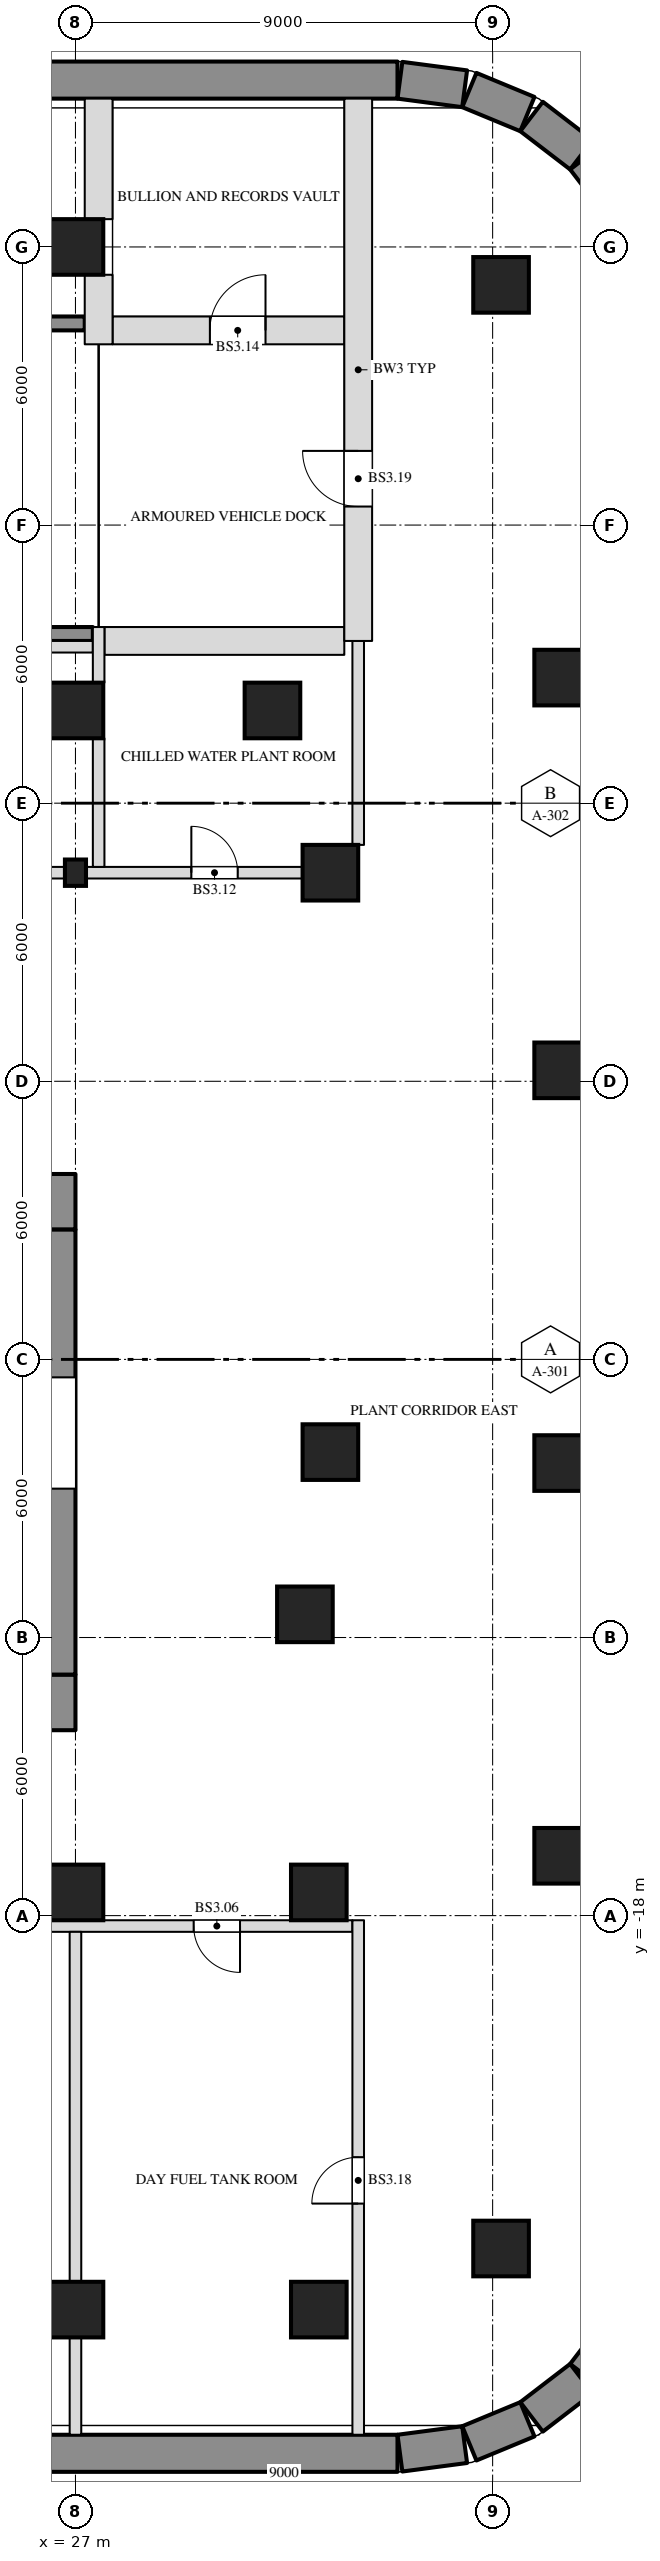
"""IFC4 building model, lengths in metres.
Left out: names, types, materials, properties, quantities, classifications, styles, units other than length and angle.
Written with IfcOpenShell. Run it as: python <this file> out.ifc"""

import sys

from ifc_helpers import new_model, si_unit, direction, frame, frame_2d, origin, origin_2d, place, context, subcontext, project, spatial, rectangle, i_section, extrude, element, fill, save


model = new_model("IFC4")
c1 = context("Model", 3, precision=1e-05, world=origin(), true_north=direction((0.0, 1.0)))
c2 = subcontext(c1, "Body", "Model", "MODEL_VIEW")
j1 = project(units=[si_unit("LENGTHUNIT", "METRE"), si_unit("PLANEANGLEUNIT", "RADIAN")], contexts=[c1])
p1 = place(None, origin())
s1 = spatial("IfcSite", under=j1, at=p1, CompositionType="ELEMENT")
p2 = place(p1, origin())
s2 = spatial("IfcBuilding", under=s1, at=p2, CompositionType="ELEMENT")
p3 = place(p2, frame((0.0, 0.0, -12.6)))
s3 = spatial("IfcBuildingStorey", under=s2, at=p3, CompositionType="ELEMENT", Elevation=-12.6)
for number, where, z_axis, x_axis in (
    (1, (33.948, -29.6, 0.0), (0.0, 0.0, 1.0), (-1.0, 0.0, 0.0)),
    (2, (-33.948, 21.6, 0.0), (0.0, 0.0, 1.0), (1.0, 0.0, 0.0)),
):
    element("IfcWall", number, at=place(p3, frame(where, z_axis=z_axis, x_axis=x_axis)), inside=s3, PredefinedType="SOLIDWALL", context=c2, shape_type="SweptSolid", body=[
        extrude(rectangle(XDim=67.895, YDim=0.8, at=frame_2d((33.948, 0.0))), origin(), (0.0, 0.0, 1.0), 4.2),
    ])
p4 = place(p3, frame((34.0, 21.597, 0.0), z_axis=(0.0, 0.0, 1.0), x_axis=(0.99144603414, -0.130517283865, 0.0)))
e3 = element("IfcWall", 3, at=p4, inside=s3, PredefinedType="SOLIDWALL", context=c2, shape_type="SweptSolid", body=[
    extrude(rectangle(XDim=1.408, YDim=0.8, at=frame_2d((0.704, 0.0))), origin(), (0.0, 0.0, 1.0), 4.2),
])
for number, where, z_axis, x_axis in (
    (4, (35.497, 21.386, 0.0), (0.0, 0.0, 1.0), (0.924, -0.383, 0.0)),
    (5, (36.84, 20.815, 0.0), (0.0, 0.0, 1.0), (0.793, -0.609, 0.0)),
    (6, (37.99, 19.916, 0.0), (0.0, 0.0, 1.0), (0.609, -0.793, 0.0)),
    (7, (38.815, -26.84, 0.0), (0.0, 0.0, 1.0), (-0.609, -0.793, 0.0)),
    (8, (37.916, -27.99, 0.0), (0.0, 0.0, 1.0), (-0.793, -0.609, 0.0)),
    (9, (36.75, -28.867, 0.0), (0.0, 0.0, 1.0), (-0.924, -0.383, 0.0)),
):
    element("IfcWall", number, at=place(p3, frame(where, z_axis=z_axis, x_axis=x_axis)), inside=s3, PredefinedType="SOLIDWALL", context=c2, shape_type="SweptSolid", body=[
        extrude(rectangle(XDim=1.355, YDim=0.8, at=frame_2d((0.678, 0.0))), origin(), (0.0, 0.0, 1.0), 4.2),
    ])
p5 = place(p3, frame((35.396, -29.413, 0.0), z_axis=(0.0, 0.0, 1.0), x_axis=(-0.99144603414, -0.130517283865, 0.0)))
e10 = element("IfcWall", 10, at=p5, inside=s3, PredefinedType="SOLIDWALL", context=c2, shape_type="SweptSolid", body=[
    extrude(rectangle(XDim=1.408, YDim=0.8, at=frame_2d((0.704, 0.0))), origin(), (0.0, 0.0, 1.0), 4.2),
])
for number, where, z_axis, x_axis in (
    (11, (27.0, -26.5, 0.0), (0.0, 0.0, 1.0), (1.0, 0.0, 0.0)),
    (12, (32.25, -26.5, 0.0), (0.0, 0.0, 1.0), (1.0, 0.0, 0.0)),
    (13, (36.182, -25.182, 0.0), (0.0, 0.0, 1.0), (1.0, 0.0, 0.0)),
    (14, (27.0, -17.5, 0.0), (0.0, 0.0, 1.0), (1.0, 0.0, 0.0)),
    (15, (32.25, -17.5, 0.0), (0.0, 0.0, 1.0), (1.0, 0.0, 0.0)),
    (16, (37.5, -16.709, 0.0), (0.0, 0.0, 1.0), (1.0, 0.0, 0.0)),
    (17, (31.95, -11.5, 0.0), (0.0, 0.0, 1.0), (1.0, 0.0, 0.0)),
    (18, (37.5, -8.236, 0.0), (0.0, 0.0, 1.0), (1.0, 0.0, 0.0)),
    (19, (32.5, -8.0, 0.0), (0.0, 0.0, 1.0), (1.0, 0.0, 0.0)),
    (20, (37.5, 0.236, 0.0), (0.0, 0.0, 1.0), (1.0, 0.0, 0.0)),
):
    element("IfcColumn", number, at=place(p3, frame(where, z_axis=z_axis, x_axis=x_axis)), inside=s3, PredefinedType="COLUMN", context=c2, shape_type="SweptSolid", body=[
        extrude(rectangle(XDim=1.2, YDim=1.2, at=origin_2d()), origin(), (0.0, 0.0, 1.0), 4.2),
    ])
p6 = place(p3, frame((27.0, 4.5, 0.0), z_axis=(0.0, 0.0, 1.0), x_axis=(1.0, 0.0, 0.0)))
e21 = element("IfcColumn", 21, at=p6, inside=s3, PredefinedType="COLUMN", context=c2, shape_type="SweptSolid", body=[
    extrude(i_section(OverallWidth=0.455, OverallDepth=0.569, WebThickness=0.078, FlangeThickness=0.125, at=origin_2d()), origin(), (0.0, 0.0, 1.0), 4.2),
])
for number, where, z_axis, x_axis in (
    (22, (32.5, 4.5, 0.0), (0.0, 0.0, 1.0), (1.0, 0.0, 0.0)),
    (23, (27.0, 8.0, 0.0), (0.0, 0.0, 1.0), (1.0, 0.0, 0.0)),
    (24, (31.25, 8.0, 0.0), (0.0, 0.0, 1.0), (1.0, 0.0, 0.0)),
    (25, (37.5, 8.709, 0.0), (0.0, 0.0, 1.0), (1.0, 0.0, 0.0)),
    (26, (36.182, 17.182, 0.0), (0.0, 0.0, 1.0), (1.0, 0.0, 0.0)),
    (27, (27.0, 18.0, 0.0), (0.0, 0.0, 1.0), (1.0, 0.0, 0.0)),
):
    element("IfcColumn", number, at=place(p3, frame(where, z_axis=z_axis, x_axis=x_axis)), inside=s3, PredefinedType="COLUMN", context=c2, shape_type="SweptSolid", body=[
        extrude(rectangle(XDim=1.2, YDim=1.2, at=origin_2d()), origin(), (0.0, 0.0, 1.0), 4.2),
    ])
p7 = place(p3, frame((-27.0, -2.6, 0.0), z_axis=(0.0, 0.0, 1.0), x_axis=(1.0, 0.0, 0.0)))
e28 = element("IfcWall", 28, at=p7, inside=s3, PredefinedType="SHEAR", context=c2, shape_type="SweptSolid", body=[
    extrude(rectangle(XDim=54.0, YDim=1.2, at=frame_2d((27.0, 0.0))), origin(), (0.0, 0.0, 1.0), 3.9),
])
p8 = place(p7, frame((15.15, 0.0, 0.0)))
e29 = element("IfcOpeningElement", 29, at=p8, cuts=e28, PredefinedType="OPENING", context=c2, shape_type="SweptSolid", body=[
    extrude(rectangle(XDim=2.4, YDim=2.1, at=frame_2d((1.2, 1.05))), frame((0.0, 0.612, 0.0), z_axis=(0.0, -1.0, 0.0), x_axis=(1.0, 0.0, 0.0)), (0.0, 0.0, 1.0), 1.224),
])
p9 = place(p7, frame((36.45, 0.0, 0.0)))
e30 = element("IfcOpeningElement", 30, at=p9, cuts=e28, PredefinedType="OPENING", context=c2, shape_type="SweptSolid", body=[
    extrude(rectangle(XDim=2.4, YDim=2.1, at=frame_2d((1.2, 1.05))), frame((0.0, 0.612, 0.0), z_axis=(0.0, -1.0, 0.0), x_axis=(1.0, 0.0, 0.0)), (0.0, 0.0, 1.0), 1.224),
])
p10 = place(p3, frame((-27.0, -13.4, 0.0), z_axis=(0.0, 0.0, 1.0), x_axis=(1.0, 0.0, 0.0)))
e31 = element("IfcWall", 31, at=p10, inside=s3, PredefinedType="SHEAR", context=c2, shape_type="SweptSolid", body=[
    extrude(rectangle(XDim=54.0, YDim=1.2, at=frame_2d((27.0, 0.0))), origin(), (0.0, 0.0, 1.0), 3.9),
])
p11 = place(p10, frame((16.45, 0.0, 0.0)))
e32 = element("IfcOpeningElement", 32, at=p11, cuts=e31, PredefinedType="OPENING", context=c2, shape_type="SweptSolid", body=[
    extrude(rectangle(XDim=1.0, YDim=2.1, at=frame_2d((0.5, 1.05))), frame((0.0, 0.612, 0.0), z_axis=(0.0, -1.0, 0.0), x_axis=(1.0, 0.0, 0.0)), (0.0, 0.0, 1.0), 1.224),
])
p12 = place(p10, frame((36.55, 0.0, 0.0)))
e33 = element("IfcOpeningElement", 33, at=p12, cuts=e31, PredefinedType="OPENING", context=c2, shape_type="SweptSolid", body=[
    extrude(rectangle(XDim=1.0, YDim=2.1, at=frame_2d((0.5, 1.05))), frame((0.0, 0.612, 0.0), z_axis=(0.0, -1.0, 0.0), x_axis=(1.0, 0.0, 0.0)), (0.0, 0.0, 1.0), 1.224),
])
p13 = place(p3, frame((26.4, -12.8, 0.0), z_axis=(0.0, 0.0, 1.0), x_axis=(0.0, 1.0, 0.0)))
e34 = element("IfcWall", 34, at=p13, inside=s3, PredefinedType="SHEAR", context=c2, shape_type="SweptSolid", body=[
    extrude(rectangle(XDim=9.6, YDim=1.2, at=frame_2d((4.8, 0.0))), origin(), (0.0, 0.0, 1.0), 3.9),
])
p14 = place(p13, frame((4.012, 0.0, 0.0)))
e35 = element("IfcOpeningElement", 35, at=p14, cuts=e34, PredefinedType="OPENING", context=c2, shape_type="SweptSolid", body=[
    extrude(rectangle(XDim=2.4, YDim=2.1, at=frame_2d((1.2, 1.05))), frame((0.0, 0.612, 0.0), z_axis=(0.0, -1.0, 0.0), x_axis=(1.0, 0.0, 0.0)), (0.0, 0.0, 1.0), 1.224),
])
p15 = place(p3, frame((-32.975, -18.225, 0.0), z_axis=(0.0, 0.0, 1.0), x_axis=(1.0, 0.0, 0.0)))
e36 = element("IfcWall", 36, at=p15, inside=s3, PredefinedType="SOLIDWALL", context=c2, shape_type="SweptSolid", body=[
    extrude(rectangle(XDim=65.95, YDim=0.25, at=frame_2d((32.975, 0.0))), origin(), (0.0, 0.0, 1.0), 3.9),
])
p16 = place(p15, frame((2.425, 0.0, 0.0)))
e37 = element("IfcOpeningElement", 37, at=p16, cuts=e36, PredefinedType="OPENING", context=c2, shape_type="SweptSolid", body=[
    extrude(rectangle(XDim=1.0, YDim=2.1, at=frame_2d((0.5, 1.05))), frame((0.0, 0.137, 0.0), z_axis=(0.0, -1.0, 0.0), x_axis=(1.0, 0.0, 0.0)), (0.0, 0.0, 1.0), 0.274),
])
p17 = place(p15, frame((9.575, 0.0, 0.0)))
e38 = element("IfcOpeningElement", 38, at=p17, cuts=e36, PredefinedType="OPENING", context=c2, shape_type="SweptSolid", body=[
    extrude(rectangle(XDim=1.8, YDim=2.1, at=frame_2d((0.9, 1.05))), frame((0.0, 0.137, 0.0), z_axis=(0.0, -1.0, 0.0), x_axis=(1.0, 0.0, 0.0)), (0.0, 0.0, 1.0), 0.274),
])
p18 = place(p15, frame((18.575, 0.0, 0.0)))
e39 = element("IfcOpeningElement", 39, at=p18, cuts=e36, PredefinedType="OPENING", context=c2, shape_type="SweptSolid", body=[
    extrude(rectangle(XDim=1.8, YDim=2.1, at=frame_2d((0.9, 1.05))), frame((0.0, 0.137, 0.0), z_axis=(0.0, -1.0, 0.0), x_axis=(1.0, 0.0, 0.0)), (0.0, 0.0, 1.0), 0.274),
])
p19 = place(p15, frame((33.575, 0.0, 0.0)))
e40 = element("IfcOpeningElement", 40, at=p19, cuts=e36, PredefinedType="OPENING", context=c2, shape_type="SweptSolid", body=[
    extrude(rectangle(XDim=1.8, YDim=2.1, at=frame_2d((0.9, 1.05))), frame((0.0, 0.137, 0.0), z_axis=(0.0, -1.0, 0.0), x_axis=(1.0, 0.0, 0.0)), (0.0, 0.0, 1.0), 0.274),
])
p20 = place(p15, frame((51.575, 0.0, 0.0)))
e41 = element("IfcOpeningElement", 41, at=p20, cuts=e36, PredefinedType="OPENING", context=c2, shape_type="SweptSolid", body=[
    extrude(rectangle(XDim=1.8, YDim=2.1, at=frame_2d((0.9, 1.05))), frame((0.0, 0.137, 0.0), z_axis=(0.0, -1.0, 0.0), x_axis=(1.0, 0.0, 0.0)), (0.0, 0.0, 1.0), 0.274),
])
p21 = place(p15, frame((62.525, 0.0, 0.0)))
e42 = element("IfcOpeningElement", 42, at=p21, cuts=e36, PredefinedType="OPENING", context=c2, shape_type="SweptSolid", body=[
    extrude(rectangle(XDim=1.0, YDim=2.1, at=frame_2d((0.5, 1.05))), frame((0.0, 0.137, 0.0), z_axis=(0.0, -1.0, 0.0), x_axis=(1.0, 0.0, 0.0)), (0.0, 0.0, 1.0), 0.274),
])
p22 = place(p3, frame((18.227, 4.5, 0.0), z_axis=(0.0, 0.0, 1.0), x_axis=(1.0, 0.0, 0.0)))
e43 = element("IfcWall", 43, at=p22, inside=s3, PredefinedType="SOLIDWALL", context=c2, shape_type="SweptSolid", body=[
    extrude(rectangle(XDim=8.545, YDim=0.25, at=frame_2d((4.273, 0.0))), origin(), (0.0, 0.0, 1.0), 3.9),
])
p23 = place(p22, frame((3.773, 0.0, 0.0)))
e44 = element("IfcOpeningElement", 44, at=p23, cuts=e43, PredefinedType="OPENING", context=c2, shape_type="SweptSolid", body=[
    extrude(rectangle(XDim=1.0, YDim=2.1, at=frame_2d((0.5, 1.05))), frame((0.0, 0.137, 0.0), z_axis=(0.0, -1.0, 0.0), x_axis=(1.0, 0.0, 0.0)), (0.0, 0.0, 1.0), 0.274),
])
p24 = place(p3, frame((27.227, 4.5, 0.0), z_axis=(0.0, 0.0, 1.0), x_axis=(1.0, 0.0, 0.0)))
e45 = element("IfcWall", 45, at=p24, inside=s3, PredefinedType="SOLIDWALL", context=c2, shape_type="SweptSolid", body=[
    extrude(rectangle(XDim=4.673, YDim=0.25, at=frame_2d((2.336, 0.0))), origin(), (0.0, 0.0, 1.0), 3.9),
])
p25 = place(p24, frame((2.273, 0.0, 0.0)))
e46 = element("IfcOpeningElement", 46, at=p25, cuts=e45, PredefinedType="OPENING", context=c2, shape_type="SweptSolid", body=[
    extrude(rectangle(XDim=1.0, YDim=2.1, at=frame_2d((0.5, 1.05))), frame((0.0, 0.137, 0.0), z_axis=(0.0, -1.0, 0.0), x_axis=(1.0, 0.0, 0.0)), (0.0, 0.0, 1.0), 0.274),
])
p26 = place(p3, frame((-1.7, 9.375, 0.0), z_axis=(0.0, 0.0, 1.0), x_axis=(1.0, 0.0, 0.0)))
e47 = element("IfcWall", 47, at=p26, inside=s3, PredefinedType="SOLIDWALL", context=c2, shape_type="SweptSolid", body=[
    extrude(rectangle(XDim=29.075, YDim=0.25, at=frame_2d((14.538, 0.0))), origin(), (0.0, 0.0, 1.0), 3.9),
])
p27 = place(p3, frame((27.625, 9.5, 0.0), z_axis=(0.0, 0.0, 1.0), x_axis=(1.0, 0.0, 0.0)))
e48 = element("IfcWall", 48, at=p27, inside=s3, PredefinedType="SOLIDWALL", context=c2, shape_type="SweptSolid", body=[
    extrude(rectangle(XDim=5.175, YDim=0.6, at=frame_2d((2.587, 0.0))), origin(), (0.0, 0.0, 1.0), 3.9),
])
p28 = place(p3, frame((27.8, 16.2, 0.0), z_axis=(0.0, 0.0, 1.0), x_axis=(1.0, 0.0, 0.0)))
e49 = element("IfcWall", 49, at=p28, inside=s3, PredefinedType="SOLIDWALL", context=c2, shape_type="SweptSolid", body=[
    extrude(rectangle(XDim=5.0, YDim=0.6, at=frame_2d((2.5, 0.0))), origin(), (0.0, 0.0, 1.0), 3.9),
])
p29 = place(p28, frame((2.1, 0.0, 0.0)))
e50 = element("IfcOpeningElement", 50, at=p29, cuts=e49, PredefinedType="OPENING", context=c2, shape_type="SweptSolid", body=[
    extrude(rectangle(XDim=1.2, YDim=2.4, at=frame_2d((0.6, 1.2))), frame((0.0, 0.312, 0.0), z_axis=(0.0, -1.0, 0.0), x_axis=(1.0, 0.0, 0.0)), (0.0, 0.0, 1.0), 0.624),
])
p30 = place(p3, frame((27.0, -29.2, 0.0), z_axis=(0.0, 0.0, 1.0), x_axis=(0.0, 1.0, 0.0)))
e51 = element("IfcWall", 51, at=p30, inside=s3, PredefinedType="SOLIDWALL", context=c2, shape_type="SweptSolid", body=[
    extrude(rectangle(XDim=2.1, YDim=0.25, at=frame_2d((1.05, 0.0))), origin(), (0.0, 0.0, 1.0), 3.9),
])
p31 = place(p3, frame((27.0, -25.9, 0.0), z_axis=(0.0, 0.0, 1.0), x_axis=(0.0, 1.0, 0.0)))
e52 = element("IfcWall", 52, at=p31, inside=s3, PredefinedType="SOLIDWALL", context=c2, shape_type="SweptSolid", body=[
    extrude(rectangle(XDim=7.55, YDim=0.25, at=frame_2d((3.775, 0.0))), origin(), (0.0, 0.0, 1.0), 3.9),
])
p32 = place(p3, frame((27.5, 4.625, 0.0), z_axis=(0.0, 0.0, 1.0), x_axis=(0.0, 1.0, 0.0)))
e53 = element("IfcWall", 53, at=p32, inside=s3, PredefinedType="SOLIDWALL", context=c2, shape_type="SweptSolid", body=[
    extrude(rectangle(XDim=2.775, YDim=0.25, at=frame_2d((1.387, 0.0))), origin(), (0.0, 0.0, 1.0), 3.9),
])
p33 = place(p3, frame((27.5, 8.6, 0.0), z_axis=(0.0, 0.0, 1.0), x_axis=(0.0, 1.0, 0.0)))
e54 = element("IfcWall", 54, at=p33, inside=s3, PredefinedType="SOLIDWALL", context=c2, shape_type="SweptSolid", body=[
    extrude(rectangle(XDim=1.2, YDim=0.25, at=frame_2d((0.6, 0.0))), origin(), (0.0, 0.0, 1.0), 3.9),
])
p34 = place(p3, frame((27.5, 15.9, 0.0), z_axis=(0.0, 0.0, 1.0), x_axis=(0.0, 1.0, 0.0)))
e55 = element("IfcWall", 55, at=p34, inside=s3, PredefinedType="SOLIDWALL", context=c2, shape_type="SweptSolid", body=[
    extrude(rectangle(XDim=1.5, YDim=0.6, at=frame_2d((0.75, 0.0))), origin(), (0.0, 0.0, 1.0), 3.9),
])
p35 = place(p3, frame((27.5, 18.6, 0.0), z_axis=(0.0, 0.0, 1.0), x_axis=(0.0, 1.0, 0.0)))
e56 = element("IfcWall", 56, at=p35, inside=s3, PredefinedType="SOLIDWALL", context=c2, shape_type="SweptSolid", body=[
    extrude(rectangle(XDim=2.6, YDim=0.6, at=frame_2d((1.3, 0.0))), origin(), (0.0, 0.0, 1.0), 3.9),
])
p36 = place(p3, frame((33.1, -29.2, 0.0), z_axis=(0.0, 0.0, 1.0), x_axis=(0.0, 1.0, 0.0)))
e57 = element("IfcWall", 57, at=p36, inside=s3, PredefinedType="SOLIDWALL", context=c2, shape_type="SweptSolid", body=[
    extrude(rectangle(XDim=11.1, YDim=0.25, at=frame_2d((5.55, 0.0))), origin(), (0.0, 0.0, 1.0), 3.9),
])
p37 = place(p36, frame((4.988, 0.0, 0.0)))
e58 = element("IfcOpeningElement", 58, at=p37, cuts=e57, PredefinedType="OPENING", context=c2, shape_type="SweptSolid", body=[
    extrude(rectangle(XDim=1.0, YDim=2.1, at=frame_2d((0.5, 1.05))), frame((0.0, 0.137, 0.0), z_axis=(0.0, -1.0, 0.0), x_axis=(1.0, 0.0, 0.0)), (0.0, 0.0, 1.0), 0.274),
])
p38 = place(p3, frame((33.1, 5.1, 0.0), z_axis=(0.0, 0.0, 1.0), x_axis=(0.0, 1.0, 0.0)))
e59 = element("IfcWall", 59, at=p38, inside=s3, PredefinedType="SOLIDWALL", context=c2, shape_type="SweptSolid", body=[
    extrude(rectangle(XDim=4.4, YDim=0.25, at=frame_2d((2.2, 0.0))), origin(), (0.0, 0.0, 1.0), 3.9),
])
p39 = place(p3, frame((33.1, 9.5, 0.0), z_axis=(0.0, 0.0, 1.0), x_axis=(0.0, 1.0, 0.0)))
e60 = element("IfcWall", 60, at=p39, inside=s3, PredefinedType="SOLIDWALL", context=c2, shape_type="SweptSolid", body=[
    extrude(rectangle(XDim=11.7, YDim=0.6, at=frame_2d((5.85, 0.0))), origin(), (0.0, 0.0, 1.0), 3.9),
])
p40 = place(p39, frame((2.9, 0.0, 0.0)))
e61 = element("IfcOpeningElement", 61, at=p40, cuts=e60, PredefinedType="OPENING", context=c2, shape_type="SweptSolid", body=[
    extrude(rectangle(XDim=1.2, YDim=2.4, at=frame_2d((0.6, 1.2))), frame((0.0, 0.312, 0.0), z_axis=(0.0, -1.0, 0.0), x_axis=(1.0, 0.0, 0.0)), (0.0, 0.0, 1.0), 0.624),
])
p41 = place(p3, frame((-1.7, 9.65, 0.0), z_axis=(0.0, 0.0, 1.0), x_axis=(1.0, 0.0, 0.0)))
e62 = element("IfcWall", 62, at=p41, inside=s3, PredefinedType="SOLIDWALL", context=c2, shape_type="SweptSolid", body=[
    extrude(rectangle(XDim=29.075, YDim=0.3, at=frame_2d((14.538, 0.0))), origin(), (0.0, 0.0, 1.0), 4.2),
])
p42 = place(p3, frame((-1.7, 16.35, 0.0), z_axis=(0.0, 0.0, 1.0), x_axis=(1.0, 0.0, 0.0)))
e63 = element("IfcWall", 63, at=p42, inside=s3, PredefinedType="SOLIDWALL", context=c2, shape_type="SweptSolid", body=[
    extrude(rectangle(XDim=28.9, YDim=0.3, at=frame_2d((14.45, 0.0))), origin(), (0.0, 0.0, 1.0), 4.2),
])
p43 = place(p21, origin())
e64 = element("IfcDoor", 64, at=p43, inside=s3, OperationType="SINGLE_SWING_LEFT", PredefinedType="DOOR", context=c2, shape_type="SweptSolid", body=[
    extrude(rectangle(XDim=1.0, YDim=2.1, at=frame_2d((0.5, 1.05))), frame((0.0, 0.025, 0.0), z_axis=(0.0, -1.0, 0.0), x_axis=(1.0, 0.0, 0.0)), (0.0, 0.0, 1.0), 0.05),
])
fill(e42, e64)
p44 = place(p25, origin())
e65 = element("IfcDoor", 65, at=p44, inside=s3, OperationType="SINGLE_SWING_LEFT", PredefinedType="DOOR", context=c2, shape_type="SweptSolid", body=[
    extrude(rectangle(XDim=1.0, YDim=2.1, at=frame_2d((0.5, 1.05))), frame((0.0, 0.025, 0.0), z_axis=(0.0, -1.0, 0.0), x_axis=(1.0, 0.0, 0.0)), (0.0, 0.0, 1.0), 0.05),
])
fill(e46, e65)
p45 = place(p29, origin())
e66 = element("IfcDoor", 66, at=p45, inside=s3, OperationType="SINGLE_SWING_RIGHT", PredefinedType="DOOR", context=c2, shape_type="SweptSolid", body=[
    extrude(rectangle(XDim=1.2, YDim=2.4, at=frame_2d((0.6, 1.2))), frame((0.0, 0.025, 0.0), z_axis=(0.0, -1.0, 0.0), x_axis=(1.0, 0.0, 0.0)), (0.0, 0.0, 1.0), 0.05),
])
fill(e50, e66)
p46 = place(p37, origin())
e67 = element("IfcDoor", 67, at=p46, inside=s3, OperationType="SINGLE_SWING_LEFT", PredefinedType="DOOR", context=c2, shape_type="SweptSolid", body=[
    extrude(rectangle(XDim=1.0, YDim=2.1, at=frame_2d((0.5, 1.05))), frame((0.0, 0.025, 0.0), z_axis=(0.0, -1.0, 0.0), x_axis=(1.0, 0.0, 0.0)), (0.0, 0.0, 1.0), 0.05),
])
fill(e58, e67)
p47 = place(p40, origin())
e68 = element("IfcDoor", 68, at=p47, inside=s3, OperationType="SINGLE_SWING_RIGHT", PredefinedType="DOOR", context=c2, shape_type="SweptSolid", body=[
    extrude(rectangle(XDim=1.2, YDim=2.4, at=frame_2d((0.6, 1.2))), frame((0.0, 0.025, 0.0), z_axis=(0.0, -1.0, 0.0), x_axis=(1.0, 0.0, 0.0)), (0.0, 0.0, 1.0), 0.05),
])
fill(e61, e68)
save(model, sys.argv[1])
